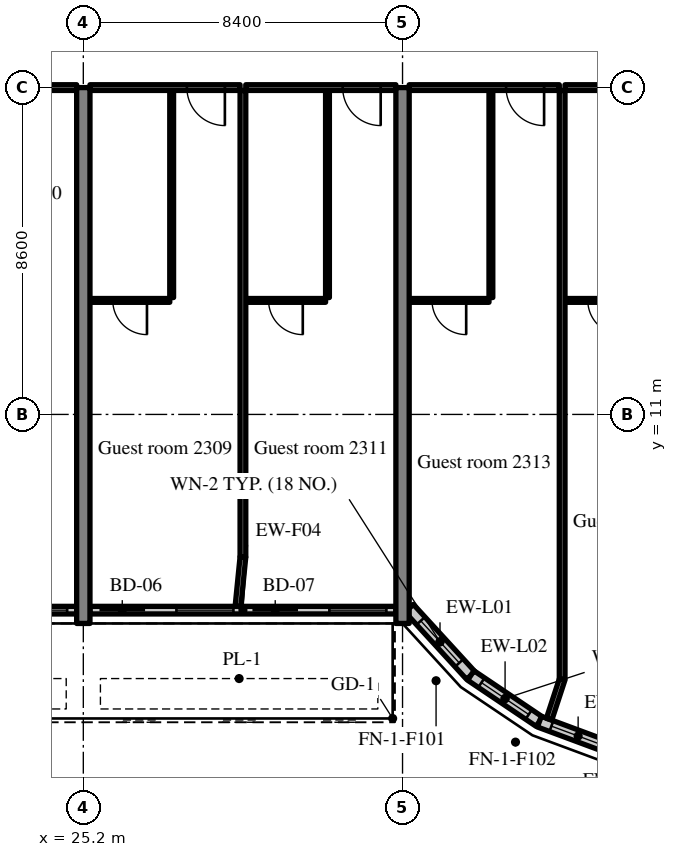
"""IFC4 building model, lengths in metres.
Left out: names, types, materials, properties, quantities, classifications, styles, units other than length and angle.
Written with IfcOpenShell. Run it as: python <this file> out.ifc"""

import sys

from ifc_helpers import new_model, si_unit, direction, frame, frame_2d, origin, place, context, subcontext, project, spatial, rectangle, extrude, source, transform, mapped, element, fill, save


model = new_model("IFC4")
c1 = context("Model", 3, precision=1e-05, world=origin(), true_north=direction((0.0, 1.0)))
c2 = subcontext(c1, "Body", "Model", "MODEL_VIEW")
j1 = project(units=[si_unit("LENGTHUNIT", "METRE"), si_unit("PLANEANGLEUNIT", "RADIAN")], contexts=[c1])
p1 = place(None, origin())
s1 = spatial("IfcSite", under=j1, at=p1, CompositionType="ELEMENT")
p2 = place(p1, origin())
s2 = spatial("IfcBuilding", under=s1, at=p2, CompositionType="ELEMENT")
p3 = place(p2, frame((0.0, 0.0, 99.0)))
s3 = spatial("IfcBuildingStorey", under=s2, at=p3, CompositionType="ELEMENT", Elevation=99.0)
m1 = source(origin(), c2, "Body", "SweptSolid", [
    extrude(rectangle(XDim=14.1, YDim=0.35, at=frame_2d((7.05, 0.0))), origin(), (0.0, 0.0, 1.0), 3.52),
])
for number, where, z_axis, x_axis in (
    (1, (25.2, 5.5, 0.0), (0.0, 0.0, 1.0), (0.0, 1.0, 0.0)),
    (2, (33.6, 5.5, 0.0), (0.0, 0.0, 1.0), (0.0, 1.0, 0.0)),
):
    element("IfcWall", number, at=place(p3, frame(where, z_axis=z_axis, x_axis=x_axis)), inside=s3, PredefinedType="SHEAR", context=c2, shape_type="MappedRepresentation", body=[
        mapped(m1, transform((0.0, 0.0, 0.0), scale=1.0)),
    ])
m2 = source(origin(), c2, "Body", "SweptSolid", [
    extrude(rectangle(XDim=8.05, YDim=0.2, at=frame_2d((4.025, 0.0))), origin(), (0.0, 0.0, 1.0), 2.82),
])
p4 = place(p3, frame((16.975, 5.85, 0.0), z_axis=(0.0, 0.0, 1.0), x_axis=(1.0, 0.0, 0.0)))
e3 = element("IfcWall", 3, at=p4, inside=s3, PredefinedType="SOLIDWALL", context=c2, shape_type="MappedRepresentation", body=[
    mapped(m2, transform((0.0, 0.0, 0.0), scale=1.0)),
])
m3 = source(origin(), c2, "Body", "SweptSolid", [
    extrude(rectangle(XDim=1.2, YDim=2.4, at=frame_2d((0.6, 1.2))), frame((0.0, 0.11, 0.0), z_axis=(0.0, -1.0, 0.0), x_axis=(1.0, 0.0, 0.0)), (0.0, 0.0, 1.0), 0.22),
])
p5 = place(p4, frame((0.25, 0.0, 0.0)))
e4 = element("IfcOpeningElement", 4, at=p5, cuts=e3, PredefinedType="OPENING", context=c2, shape_type="MappedRepresentation", body=[
    mapped(m3, transform((0.0, 0.0, 0.0), scale=1.0)),
])
m4 = source(origin(), c2, "Body", "SweptSolid", [
    extrude(rectangle(XDim=1.5, YDim=1.5, at=frame_2d((0.75, 0.75))), frame((0.0, 0.11, 0.0), z_axis=(0.0, -1.0, 0.0), x_axis=(1.0, 0.0, 0.0)), (0.0, 0.0, 1.0), 0.22),
])
p6 = place(p4, frame((2.275, 0.0, 0.9)))
e5 = element("IfcOpeningElement", 5, at=p6, cuts=e3, PredefinedType="OPENING", context=c2, shape_type="MappedRepresentation", body=[
    mapped(m4, transform((0.0, 0.0, 0.0), scale=1.0)),
])
p7 = place(p4, frame((4.275, 0.0, 0.0)))
e6 = element("IfcOpeningElement", 6, at=p7, cuts=e3, PredefinedType="OPENING", context=c2, shape_type="MappedRepresentation", body=[
    mapped(m3, transform((0.0, 0.0, 0.0), scale=1.0)),
])
p8 = place(p4, frame((6.3, 0.0, 0.9)))
e7 = element("IfcOpeningElement", 7, at=p8, cuts=e3, PredefinedType="OPENING", context=c2, shape_type="MappedRepresentation", body=[
    mapped(m4, transform((0.0, 0.0, 0.0), scale=1.0)),
])
m5 = source(origin(), c2, "Body", "SweptSolid", [
    extrude(rectangle(XDim=8.05, YDim=0.2, at=frame_2d((4.025, 0.0))), origin(), (0.0, 0.0, 1.0), 2.82),
])
p9 = place(p3, frame((25.375, 5.85, 0.0), z_axis=(0.0, 0.0, 1.0), x_axis=(1.0, 0.0, 0.0)))
e8 = element("IfcWall", 8, at=p9, inside=s3, PredefinedType="SOLIDWALL", context=c2, shape_type="MappedRepresentation", body=[
    mapped(m5, transform((0.0, 0.0, 0.0), scale=1.0)),
])
p10 = place(p9, frame((0.25, 0.0, 0.0)))
e9 = element("IfcOpeningElement", 9, at=p10, cuts=e8, PredefinedType="OPENING", context=c2, shape_type="MappedRepresentation", body=[
    mapped(m3, transform((0.0, 0.0, 0.0), scale=1.0)),
])
p11 = place(p9, frame((2.275, 0.0, 0.9)))
e10 = element("IfcOpeningElement", 10, at=p11, cuts=e8, PredefinedType="OPENING", context=c2, shape_type="MappedRepresentation", body=[
    mapped(m4, transform((0.0, 0.0, 0.0), scale=1.0)),
])
p12 = place(p9, frame((4.275, 0.0, 0.0)))
e11 = element("IfcOpeningElement", 11, at=p12, cuts=e8, PredefinedType="OPENING", context=c2, shape_type="MappedRepresentation", body=[
    mapped(m3, transform((0.0, 0.0, 0.0), scale=1.0)),
])
p13 = place(p9, frame((6.3, 0.0, 0.9)))
e12 = element("IfcOpeningElement", 12, at=p13, cuts=e8, PredefinedType="OPENING", context=c2, shape_type="MappedRepresentation", body=[
    mapped(m4, transform((0.0, 0.0, 0.0), scale=1.0)),
])
m6 = source(origin(), c2, "Body", "SweptSolid", [
    extrude(rectangle(XDim=2.398, YDim=0.3, at=frame_2d((1.199, 0.0))), origin(), (0.0, 0.0, 1.0), 3.52),
])
p14 = place(p3, frame((33.776, 5.9, 0.0), z_axis=(0.0, 0.0, 1.0), x_axis=(0.675374189419, -0.737475222815, 0.0)))
e13 = element("IfcWall", 13, at=p14, inside=s3, PredefinedType="SOLIDWALL", context=c2, shape_type="MappedRepresentation", body=[
    mapped(m6, transform((0.0, 0.0, 0.0), scale=1.0)),
])
m7 = source(origin(), c2, "Body", "SweptSolid", [
    extrude(rectangle(XDim=1.5, YDim=2.0, at=frame_2d((0.75, 1.0))), frame((0.0, 0.16, 0.0), z_axis=(0.0, -1.0, 0.0), x_axis=(1.0, 0.0, 0.0)), (0.0, 0.0, 1.0), 0.32),
])
p15 = place(p14, frame((0.449, 0.0, 0.9)))
e14 = element("IfcOpeningElement", 14, at=p15, cuts=e13, PredefinedType="OPENING", context=c2, shape_type="MappedRepresentation", body=[
    mapped(m7, transform((0.0, 0.0, 0.0), scale=1.0)),
])
m8 = source(origin(), c2, "Body", "SweptSolid", [
    extrude(rectangle(XDim=2.176, YDim=0.3, at=frame_2d((1.088, 0.0))), origin(), (0.0, 0.0, 1.0), 3.52),
])
p16 = place(p3, frame((35.396, 4.131, 0.0), z_axis=(0.0, 0.0, 1.0), x_axis=(0.829590746428, -0.558371913192, 0.0)))
e15 = element("IfcWall", 15, at=p16, inside=s3, PredefinedType="SOLIDWALL", context=c2, shape_type="MappedRepresentation", body=[
    mapped(m8, transform((0.0, 0.0, 0.0), scale=1.0)),
])
p17 = place(p16, frame((0.338, 0.0, 0.9)))
e16 = element("IfcOpeningElement", 16, at=p17, cuts=e15, PredefinedType="OPENING", context=c2, shape_type="MappedRepresentation", body=[
    mapped(m7, transform((0.0, 0.0, 0.0), scale=1.0)),
])
p18 = place(p3, frame((37.201, 2.917, 0.0), z_axis=(0.0, 0.0, 1.0), x_axis=(0.93754555999, -0.347862505801, 0.0)))
e17 = element("IfcWall", 17, at=p18, inside=s3, PredefinedType="SOLIDWALL", context=c2, shape_type="MappedRepresentation", body=[
    mapped(m8, transform((0.0, 0.0, 0.0), scale=1.0)),
])
p19 = place(p18, frame((0.338, 0.0, 0.9)))
e18 = element("IfcOpeningElement", 18, at=p19, cuts=e17, PredefinedType="OPENING", context=c2, shape_type="MappedRepresentation", body=[
    mapped(m7, transform((0.0, 0.0, 0.0), scale=1.0)),
])
m9 = source(origin(), c2, "Body", "SweptSolid", [
    extrude(rectangle(XDim=8.05, YDim=0.15, at=frame_2d((4.025, 0.0))), origin(), (0.0, 0.0, 1.0), 2.82),
])
p20 = place(p3, frame((16.975, 19.6, 0.0), z_axis=(0.0, 0.0, 1.0), x_axis=(1.0, 0.0, 0.0)))
e19 = element("IfcWall", 19, at=p20, inside=s3, PredefinedType="PARTITIONING", context=c2, shape_type="MappedRepresentation", body=[
    mapped(m9, transform((0.0, 0.0, 0.0), scale=1.0)),
])
m10 = source(origin(), c2, "Body", "SweptSolid", [
    extrude(rectangle(XDim=1.8, YDim=2.1, at=frame_2d((0.9, 1.05))), frame((0.0, 0.085, 0.0), z_axis=(0.0, -1.0, 0.0), x_axis=(1.0, 0.0, 0.0)), (0.0, 0.0, 1.0), 0.17),
])
p21 = place(p20, frame((3.125, 0.0, 0.0)))
e20 = element("IfcOpeningElement", 20, at=p21, cuts=e19, PredefinedType="OPENING", context=c2, shape_type="MappedRepresentation", body=[
    mapped(m10, transform((0.0, 0.0, 0.0), scale=1.0)),
])
m11 = source(origin(), c2, "Body", "SweptSolid", [
    extrude(rectangle(XDim=5.45, YDim=0.1, at=frame_2d((2.725, 0.0))), origin(), (0.0, 0.0, 1.0), 3.52),
])
p22 = place(p3, frame((27.525, 14.075, 0.0), z_axis=(0.0, 0.0, 1.0), x_axis=(0.0, 1.0, 0.0)))
e21 = element("IfcWall", 21, at=p22, inside=s3, PredefinedType="PARTITIONING", context=c2, shape_type="MappedRepresentation", body=[
    mapped(m11, transform((0.0, 0.0, 0.0), scale=1.0)),
])
m12 = source(origin(), c2, "Body", "SweptSolid", [
    extrude(rectangle(XDim=2.1, YDim=0.1, at=frame_2d((1.05, 0.0))), origin(), (0.0, 0.0, 1.0), 3.52),
])
p23 = place(p3, frame((25.375, 14.0, 0.0), z_axis=(0.0, 0.0, 1.0), x_axis=(1.0, 0.0, 0.0)))
e22 = element("IfcWall", 22, at=p23, inside=s3, PredefinedType="PARTITIONING", context=c2, shape_type="MappedRepresentation", body=[
    mapped(m12, transform((0.0, 0.0, 0.0), scale=1.0)),
])
m13 = source(origin(), c2, "Body", "SweptSolid", [
    extrude(rectangle(XDim=0.9, YDim=2.1, at=frame_2d((0.45, 1.05))), frame((0.0, 0.06, 0.0), z_axis=(0.0, -1.0, 0.0), x_axis=(1.0, 0.0, 0.0)), (0.0, 0.0, 1.0), 0.12),
])
p24 = place(p23, frame((0.6, 0.0, 0.0)))
e23 = element("IfcOpeningElement", 23, at=p24, cuts=e22, PredefinedType="OPENING", context=c2, shape_type="MappedRepresentation", body=[
    mapped(m13, transform((0.0, 0.0, 0.0), scale=1.0)),
])
m14 = source(origin(), c2, "Body", "SweptSolid", [
    extrude(rectangle(XDim=3.95, YDim=0.15, at=frame_2d((1.975, 0.0))), origin(), (0.0, 0.0, 1.0), 2.82),
])
p25 = place(p3, frame((25.375, 19.6, 0.0), z_axis=(0.0, 0.0, 1.0), x_axis=(1.0, 0.0, 0.0)))
e24 = element("IfcWall", 24, at=p25, inside=s3, PredefinedType="PARTITIONING", context=c2, shape_type="MappedRepresentation", body=[
    mapped(m14, transform((0.0, 0.0, 0.0), scale=1.0)),
])
m15 = source(origin(), c2, "Body", "SweptSolid", [
    extrude(rectangle(XDim=1.0, YDim=2.1, at=frame_2d((0.5, 1.05))), frame((0.0, 0.085, 0.0), z_axis=(0.0, -1.0, 0.0), x_axis=(1.0, 0.0, 0.0)), (0.0, 0.0, 1.0), 0.17),
])
p26 = place(p25, frame((2.55, 0.0, 0.0)))
e25 = element("IfcOpeningElement", 25, at=p26, cuts=e24, PredefinedType="OPENING", context=c2, shape_type="MappedRepresentation", body=[
    mapped(m15, transform((0.0, 0.0, 0.0), scale=1.0)),
])
p27 = place(p3, frame((31.625, 14.075, 0.0), z_axis=(0.0, 0.0, 1.0), x_axis=(0.0, 1.0, 0.0)))
e26 = element("IfcWall", 26, at=p27, inside=s3, PredefinedType="PARTITIONING", context=c2, shape_type="MappedRepresentation", body=[
    mapped(m11, transform((0.0, 0.0, 0.0), scale=1.0)),
])
m16 = source(origin(), c2, "Body", "SweptSolid", [
    extrude(rectangle(XDim=2.1, YDim=0.1, at=frame_2d((1.05, 0.0))), origin(), (0.0, 0.0, 1.0), 3.52),
])
p28 = place(p3, frame((29.475, 14.0, 0.0), z_axis=(0.0, 0.0, 1.0), x_axis=(1.0, 0.0, 0.0)))
e27 = element("IfcWall", 27, at=p28, inside=s3, PredefinedType="PARTITIONING", context=c2, shape_type="MappedRepresentation", body=[
    mapped(m16, transform((0.0, 0.0, 0.0), scale=1.0)),
])
p29 = place(p28, frame((0.6, 0.0, 0.0)))
e28 = element("IfcOpeningElement", 28, at=p29, cuts=e27, PredefinedType="OPENING", context=c2, shape_type="MappedRepresentation", body=[
    mapped(m13, transform((0.0, 0.0, 0.0), scale=1.0)),
])
p30 = place(p3, frame((29.475, 19.6, 0.0), z_axis=(0.0, 0.0, 1.0), x_axis=(1.0, 0.0, 0.0)))
e29 = element("IfcWall", 29, at=p30, inside=s3, PredefinedType="PARTITIONING", context=c2, shape_type="MappedRepresentation", body=[
    mapped(m14, transform((0.0, 0.0, 0.0), scale=1.0)),
])
p31 = place(p30, frame((2.55, 0.0, 0.0)))
e30 = element("IfcOpeningElement", 30, at=p31, cuts=e29, PredefinedType="OPENING", context=c2, shape_type="MappedRepresentation", body=[
    mapped(m15, transform((0.0, 0.0, 0.0), scale=1.0)),
])
m17 = source(origin(), c2, "Body", "SweptSolid", [
    extrude(rectangle(XDim=12.275, YDim=0.15, at=frame_2d((6.137, 0.0))), origin(), (0.0, 0.0, 1.0), 3.52),
])
p32 = place(p3, frame((29.4, 7.25, 0.0), z_axis=(0.0, 0.0, 1.0), x_axis=(0.0, 1.0, 0.0)))
e31 = element("IfcWall", 31, at=p32, inside=s3, PredefinedType="PARTITIONING", context=c2, shape_type="MappedRepresentation", body=[
    mapped(m17, transform((0.0, 0.0, 0.0), scale=1.0)),
])
p33 = place(p3, frame((35.925, 14.075, 0.0), z_axis=(0.0, 0.0, 1.0), x_axis=(0.0, 1.0, 0.0)))
e32 = element("IfcWall", 32, at=p33, inside=s3, PredefinedType="PARTITIONING", context=c2, shape_type="MappedRepresentation", body=[
    mapped(m11, transform((0.0, 0.0, 0.0), scale=1.0)),
])
p34 = place(p3, frame((33.775, 14.0, 0.0), z_axis=(0.0, 0.0, 1.0), x_axis=(1.0, 0.0, 0.0)))
e33 = element("IfcWall", 33, at=p34, inside=s3, PredefinedType="PARTITIONING", context=c2, shape_type="MappedRepresentation", body=[
    mapped(m12, transform((0.0, 0.0, 0.0), scale=1.0)),
])
p35 = place(p34, frame((0.6, 0.0, 0.0)))
e34 = element("IfcOpeningElement", 34, at=p35, cuts=e33, PredefinedType="OPENING", context=c2, shape_type="MappedRepresentation", body=[
    mapped(m13, transform((0.0, 0.0, 0.0), scale=1.0)),
])
m18 = source(origin(), c2, "Body", "SweptSolid", [
    extrude(rectangle(XDim=3.95, YDim=0.15, at=frame_2d((1.975, 0.0))), origin(), (0.0, 0.0, 1.0), 2.82),
])
p36 = place(p3, frame((33.775, 19.6, 0.0), z_axis=(0.0, 0.0, 1.0), x_axis=(1.0, 0.0, 0.0)))
e35 = element("IfcWall", 35, at=p36, inside=s3, PredefinedType="PARTITIONING", context=c2, shape_type="MappedRepresentation", body=[
    mapped(m18, transform((0.0, 0.0, 0.0), scale=1.0)),
])
p37 = place(p36, frame((2.55, 0.0, 0.0)))
e36 = element("IfcOpeningElement", 36, at=p37, cuts=e35, PredefinedType="OPENING", context=c2, shape_type="MappedRepresentation", body=[
    mapped(m15, transform((0.0, 0.0, 0.0), scale=1.0)),
])
p38 = place(p3, frame((37.875, 14.0, 0.0), z_axis=(0.0, 0.0, 1.0), x_axis=(1.0, 0.0, 0.0)))
e37 = element("IfcWall", 37, at=p38, inside=s3, PredefinedType="PARTITIONING", context=c2, shape_type="MappedRepresentation", body=[
    mapped(m12, transform((0.0, 0.0, 0.0), scale=1.0)),
])
p39 = place(p38, frame((0.6, 0.0, 0.0)))
e38 = element("IfcOpeningElement", 38, at=p39, cuts=e37, PredefinedType="OPENING", context=c2, shape_type="MappedRepresentation", body=[
    mapped(m13, transform((0.0, 0.0, 0.0), scale=1.0)),
])
p40 = place(p3, frame((37.875, 19.6, 0.0), z_axis=(0.0, 0.0, 1.0), x_axis=(1.0, 0.0, 0.0)))
e39 = element("IfcWall", 39, at=p40, inside=s3, PredefinedType="PARTITIONING", context=c2, shape_type="MappedRepresentation", body=[
    mapped(m14, transform((0.0, 0.0, 0.0), scale=1.0)),
])
p41 = place(p40, frame((2.55, 0.0, 0.0)))
e40 = element("IfcOpeningElement", 40, at=p41, cuts=e39, PredefinedType="OPENING", context=c2, shape_type="MappedRepresentation", body=[
    mapped(m15, transform((0.0, 0.0, 0.0), scale=1.0)),
])
m19 = source(origin(), c2, "Body", "SweptSolid", [
    extrude(rectangle(XDim=15.498, YDim=0.15, at=frame_2d((7.749, 0.0))), origin(), (0.0, 0.0, 1.0), 3.52),
])
p42 = place(p3, frame((37.8, 4.027, 0.0), z_axis=(0.0, 0.0, 1.0), x_axis=(0.0, 1.0, 0.0)))
e41 = element("IfcWall", 41, at=p42, inside=s3, PredefinedType="PARTITIONING", context=c2, shape_type="MappedRepresentation", body=[
    mapped(m19, transform((0.0, 0.0, 0.0), scale=1.0)),
])
m20 = source(origin(), c2, "Body", "SweptSolid", [
    extrude(rectangle(XDim=1.307, YDim=0.15, at=frame_2d((0.653, 0.0))), origin(), (0.0, 0.0, 1.0), 3.52),
])
p43 = place(p3, frame((29.27, 5.95, 0.0), z_axis=(0.0, 0.0, 1.0), x_axis=(0.099411212066, 0.995046436562, 0.0)))
e42 = element("IfcWall", 42, at=p43, inside=s3, PredefinedType="PARTITIONING", context=c2, shape_type="MappedRepresentation", body=[
    mapped(m20, transform((0.0, 0.0, 0.0), scale=1.0)),
])
m21 = source(origin(), c2, "Body", "SweptSolid", [
    extrude(rectangle(XDim=1.101, YDim=0.15, at=frame_2d((0.55, 0.0))), origin(), (0.0, 0.0, 1.0), 3.52),
])
p44 = place(p3, frame((37.457, 2.981, 0.0), z_axis=(0.0, 0.0, 1.0), x_axis=(0.311567081539, 0.950224159712, 0.0)))
e43 = element("IfcWall", 43, at=p44, inside=s3, PredefinedType="PARTITIONING", context=c2, shape_type="MappedRepresentation", body=[
    mapped(m21, transform((0.0, 0.0, 0.0), scale=1.0)),
])
m22 = source(origin(), c2, "Body", "SweptSolid", [
    extrude(rectangle(XDim=1.5, YDim=1.5, at=frame_2d((0.75, 0.75))), frame((0.0, 0.03, 0.0), z_axis=(0.0, -1.0, 0.0), x_axis=(1.0, 0.0, 0.0)), (0.0, 0.0, 1.0), 0.06),
])
p45 = place(p8, origin())
e44 = element("IfcWindow", 44, at=p45, inside=s3, PartitioningType="SINGLE_PANEL", PredefinedType="WINDOW", context=c2, shape_type="MappedRepresentation", body=[
    mapped(m22, transform((0.0, 0.0, 0.0), scale=1.0)),
])
fill(e7, e44)
m23 = source(origin(), c2, "Body", "SweptSolid", [
    extrude(rectangle(XDim=1.2, YDim=2.4, at=frame_2d((0.6, 1.2))), frame((0.0, 0.025, 0.0), z_axis=(0.0, -1.0, 0.0), x_axis=(1.0, 0.0, 0.0)), (0.0, 0.0, 1.0), 0.05),
])
p46 = place(p10, origin())
e45 = element("IfcDoor", 45, at=p46, inside=s3, OperationType="SLIDING_TO_RIGHT", PredefinedType="DOOR", context=c2, shape_type="MappedRepresentation", body=[
    mapped(m23, transform((0.0, 0.0, 0.0), scale=1.0)),
])
fill(e9, e45)
p47 = place(p11, origin())
e46 = element("IfcWindow", 46, at=p47, inside=s3, PartitioningType="SINGLE_PANEL", PredefinedType="WINDOW", context=c2, shape_type="MappedRepresentation", body=[
    mapped(m22, transform((0.0, 0.0, 0.0), scale=1.0)),
])
fill(e10, e46)
p48 = place(p12, origin())
e47 = element("IfcDoor", 47, at=p48, inside=s3, OperationType="SLIDING_TO_LEFT", PredefinedType="DOOR", context=c2, shape_type="MappedRepresentation", body=[
    mapped(m23, transform((0.0, 0.0, 0.0), scale=1.0)),
])
fill(e11, e47)
p49 = place(p13, origin())
e48 = element("IfcWindow", 48, at=p49, inside=s3, PartitioningType="SINGLE_PANEL", PredefinedType="WINDOW", context=c2, shape_type="MappedRepresentation", body=[
    mapped(m22, transform((0.0, 0.0, 0.0), scale=1.0)),
])
fill(e12, e48)
m24 = source(origin(), c2, "Body", "SweptSolid", [
    extrude(rectangle(XDim=1.5, YDim=2.0, at=frame_2d((0.75, 1.0))), frame((0.0, 0.03, 0.0), z_axis=(0.0, -1.0, 0.0), x_axis=(1.0, 0.0, 0.0)), (0.0, 0.0, 1.0), 0.06),
])
p50 = place(p15, origin())
e49 = element("IfcWindow", 49, at=p50, inside=s3, PartitioningType="SINGLE_PANEL", PredefinedType="WINDOW", context=c2, shape_type="MappedRepresentation", body=[
    mapped(m24, transform((0.0, 0.0, 0.0), scale=1.0)),
])
fill(e14, e49)
p51 = place(p17, origin())
e50 = element("IfcWindow", 50, at=p51, inside=s3, PartitioningType="SINGLE_PANEL", PredefinedType="WINDOW", context=c2, shape_type="MappedRepresentation", body=[
    mapped(m24, transform((0.0, 0.0, 0.0), scale=1.0)),
])
fill(e16, e50)
p52 = place(p19, origin())
e51 = element("IfcWindow", 51, at=p52, inside=s3, PartitioningType="SINGLE_PANEL", PredefinedType="WINDOW", context=c2, shape_type="MappedRepresentation", body=[
    mapped(m24, transform((0.0, 0.0, 0.0), scale=1.0)),
])
fill(e18, e51)
m25 = source(origin(), c2, "Body", "SweptSolid", [
    extrude(rectangle(XDim=0.9, YDim=2.1, at=frame_2d((0.45, 1.05))), frame((0.0, 0.025, 0.0), z_axis=(0.0, -1.0, 0.0), x_axis=(1.0, 0.0, 0.0)), (0.0, 0.0, 1.0), 0.05),
])
p53 = place(p24, origin())
e52 = element("IfcDoor", 52, at=p53, inside=s3, OperationType="SINGLE_SWING_RIGHT", PredefinedType="DOOR", context=c2, shape_type="MappedRepresentation", body=[
    mapped(m25, transform((0.0, 0.0, 0.0), scale=1.0)),
])
fill(e23, e52)
m26 = source(origin(), c2, "Body", "SweptSolid", [
    extrude(rectangle(XDim=1.0, YDim=2.1, at=frame_2d((0.5, 1.05))), frame((0.0, 0.025, 0.0), z_axis=(0.0, -1.0, 0.0), x_axis=(1.0, 0.0, 0.0)), (0.0, 0.0, 1.0), 0.05),
])
p54 = place(p26, origin())
e53 = element("IfcDoor", 53, at=p54, inside=s3, OperationType="SINGLE_SWING_RIGHT", PredefinedType="DOOR", context=c2, shape_type="MappedRepresentation", body=[
    mapped(m26, transform((0.0, 0.0, 0.0), scale=1.0)),
])
fill(e25, e53)
p55 = place(p29, origin())
e54 = element("IfcDoor", 54, at=p55, inside=s3, OperationType="SINGLE_SWING_RIGHT", PredefinedType="DOOR", context=c2, shape_type="MappedRepresentation", body=[
    mapped(m25, transform((0.0, 0.0, 0.0), scale=1.0)),
])
fill(e28, e54)
p56 = place(p31, origin())
e55 = element("IfcDoor", 55, at=p56, inside=s3, OperationType="SINGLE_SWING_RIGHT", PredefinedType="DOOR", context=c2, shape_type="MappedRepresentation", body=[
    mapped(m26, transform((0.0, 0.0, 0.0), scale=1.0)),
])
fill(e30, e55)
p57 = place(p35, origin())
e56 = element("IfcDoor", 56, at=p57, inside=s3, OperationType="SINGLE_SWING_RIGHT", PredefinedType="DOOR", context=c2, shape_type="MappedRepresentation", body=[
    mapped(m25, transform((0.0, 0.0, 0.0), scale=1.0)),
])
fill(e34, e56)
p58 = place(p37, origin())
e57 = element("IfcDoor", 57, at=p58, inside=s3, OperationType="SINGLE_SWING_RIGHT", PredefinedType="DOOR", context=c2, shape_type="MappedRepresentation", body=[
    mapped(m26, transform((0.0, 0.0, 0.0), scale=1.0)),
])
fill(e36, e57)
p59 = place(p39, origin())
e58 = element("IfcDoor", 58, at=p59, inside=s3, OperationType="SINGLE_SWING_RIGHT", PredefinedType="DOOR", context=c2, shape_type="MappedRepresentation", body=[
    mapped(m25, transform((0.0, 0.0, 0.0), scale=1.0)),
])
fill(e38, e58)
save(model, sys.argv[1])
